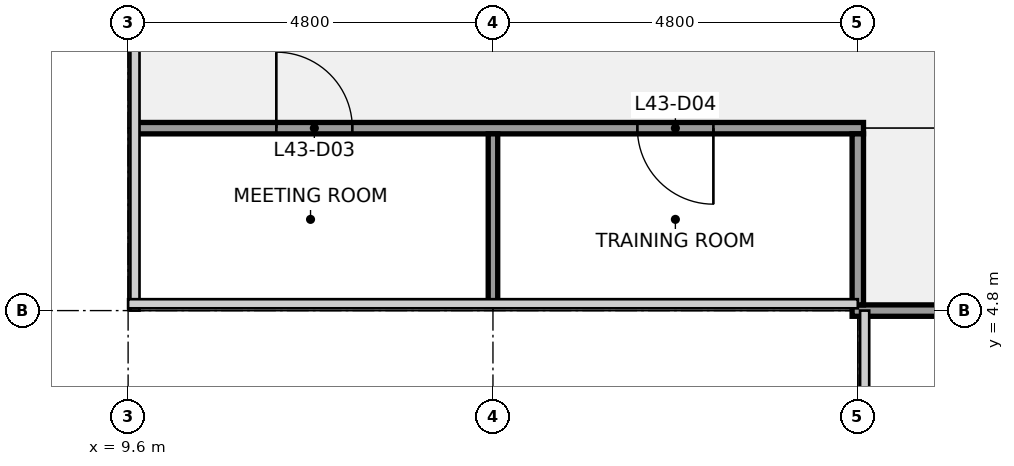
"""IFC4 building model, lengths in metres.
Left out: names, types, materials, properties, quantities, classifications, styles, units other than length and angle.
Written with IfcOpenShell. Run it as: python <this file> out.ifc"""

import sys

from ifc_helpers import new_model, si_unit, direction, frame, frame_2d, origin, place, context, subcontext, project, spatial, rectangle, extrude, element, fill, save


model = new_model("IFC4")
c1 = context("Model", 3, precision=1e-05, world=origin(), true_north=direction((0.0, 1.0)))
c2 = subcontext(c1, "Body", "Model", "MODEL_VIEW")
j1 = project(units=[si_unit("LENGTHUNIT", "METRE"), si_unit("PLANEANGLEUNIT", "RADIAN")], contexts=[c1])
p1 = place(None, origin())
s1 = spatial("IfcSite", under=j1, at=p1, CompositionType="ELEMENT")
p2 = place(p1, origin())
s2 = spatial("IfcBuilding", under=s1, at=p2, CompositionType="ELEMENT")
p3 = place(p2, frame((0.0, 0.0, 201.2)))
s3 = spatial("IfcBuildingStorey", under=s2, at=p3, CompositionType="ELEMENT", Elevation=201.2)
p4 = place(p3, frame((19.125, 4.8, 0.0), z_axis=(0.0, 0.0, 1.0), x_axis=(1.0, 0.0, 0.0)))
e1 = element("IfcWall", 1, at=p4, inside=s3, PredefinedType="PARTITIONING", context=c2, shape_type="SweptSolid", body=[
    extrude(rectangle(XDim=19.35, YDim=0.15, at=frame_2d((9.675, 0.0))), origin(), (0.0, 0.0, 1.0), 2.87),
])
p5 = place(p4, frame((4.375, 0.0, 0.0)))
e2 = element("IfcOpeningElement", 2, at=p5, cuts=e1, PredefinedType="OPENING", context=c2, shape_type="SweptSolid", body=[
    extrude(rectangle(XDim=1.0, YDim=2.1, at=frame_2d((0.5, 1.05))), frame((0.0, 0.085, 0.0), z_axis=(0.0, -1.0, 0.0), x_axis=(1.0, 0.0, 0.0)), (0.0, 0.0, 1.0), 0.17),
])
p6 = place(p4, frame((13.975, 0.0, 0.0)))
e3 = element("IfcOpeningElement", 3, at=p6, cuts=e1, PredefinedType="OPENING", context=c2, shape_type="SweptSolid", body=[
    extrude(rectangle(XDim=1.0, YDim=2.1, at=frame_2d((0.5, 1.05))), frame((0.0, 0.085, 0.0), z_axis=(0.0, -1.0, 0.0), x_axis=(1.0, 0.0, 0.0)), (0.0, 0.0, 1.0), 0.17),
])
p7 = place(p3, frame((9.7, 7.2, 0.0), z_axis=(0.0, 0.0, 1.0), x_axis=(1.0, 0.0, 0.0)))
e4 = element("IfcWall", 4, at=p7, inside=s3, PredefinedType="PARTITIONING", context=c2, shape_type="SweptSolid", body=[
    extrude(rectangle(XDim=9.575, YDim=0.15, at=frame_2d((4.788, 0.0))), origin(), (0.0, 0.0, 1.0), 2.87),
])
p8 = place(p7, frame((1.85, 0.0, 0.0)))
e5 = element("IfcOpeningElement", 5, at=p8, cuts=e4, PredefinedType="OPENING", context=c2, shape_type="SweptSolid", body=[
    extrude(rectangle(XDim=1.0, YDim=2.1, at=frame_2d((0.5, 1.05))), frame((0.0, 0.085, 0.0), z_axis=(0.0, -1.0, 0.0), x_axis=(1.0, 0.0, 0.0)), (0.0, 0.0, 1.0), 0.17),
])
p9 = place(p7, frame((6.6, 0.0, 0.0)))
e6 = element("IfcOpeningElement", 6, at=p9, cuts=e4, PredefinedType="OPENING", context=c2, shape_type="SweptSolid", body=[
    extrude(rectangle(XDim=1.0, YDim=2.1, at=frame_2d((0.5, 1.05))), frame((0.0, 0.085, 0.0), z_axis=(0.0, -1.0, 0.0), x_axis=(1.0, 0.0, 0.0)), (0.0, 0.0, 1.0), 0.17),
])
p10 = place(p3, frame((14.4, 4.9, 0.0), z_axis=(0.0, 0.0, 1.0), x_axis=(0.0, 1.0, 0.0)))
e7 = element("IfcWall", 7, at=p10, inside=s3, PredefinedType="PARTITIONING", context=c2, shape_type="SweptSolid", body=[
    extrude(rectangle(XDim=2.225, YDim=0.125, at=frame_2d((1.113, 0.0))), origin(), (0.0, 0.0, 1.0), 2.87),
])
p11 = place(p3, frame((19.2, 4.875, 0.0), z_axis=(0.0, 0.0, 1.0), x_axis=(0.0, 1.0, 0.0)))
e8 = element("IfcWall", 8, at=p11, inside=s3, PredefinedType="PARTITIONING", context=c2, shape_type="SweptSolid", body=[
    extrude(rectangle(XDim=2.25, YDim=0.15, at=frame_2d((1.125, 0.0))), origin(), (0.0, 0.0, 1.0), 2.87),
])
p12 = place(p8, origin())
e9 = element("IfcDoor", 9, at=p12, inside=s3, OperationType="SINGLE_SWING_LEFT", PredefinedType="DOOR", context=c2, shape_type="SweptSolid", body=[
    extrude(rectangle(XDim=1.0, YDim=2.1, at=frame_2d((0.5, 1.05))), frame((0.0, 0.025, 0.0), z_axis=(0.0, -1.0, 0.0), x_axis=(1.0, 0.0, 0.0)), (0.0, 0.0, 1.0), 0.05),
])
fill(e5, e9)
p13 = place(p9, origin())
e10 = element("IfcDoor", 10, at=p13, inside=s3, OperationType="SINGLE_SWING_RIGHT", PredefinedType="DOOR", context=c2, shape_type="SweptSolid", body=[
    extrude(rectangle(XDim=1.0, YDim=2.1, at=frame_2d((0.5, 1.05))), frame((0.0, 0.025, 0.0), z_axis=(0.0, -1.0, 0.0), x_axis=(1.0, 0.0, 0.0)), (0.0, 0.0, 1.0), 0.05),
])
fill(e6, e10)
save(model, sys.argv[1])
